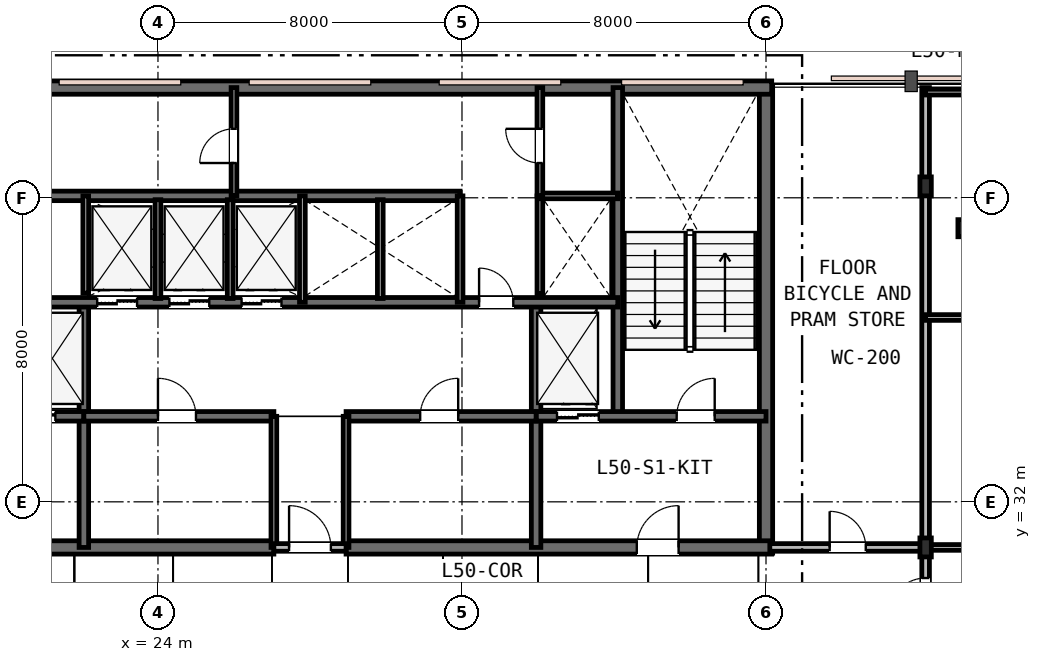
"""IFC4 building model, lengths in metres.
Left out: names, types, materials, properties, quantities, classifications, styles, units other than length and angle.
Written with IfcOpenShell. Run it as: python <this file> out.ifc"""

import sys

from ifc_helpers import new_model, si_unit, direction, frame, frame_2d, origin, origin_2d, place, context, subcontext, project, spatial, rectangle, i_section, extrude, element, fill, save


model = new_model("IFC4")
c1 = context("Model", 3, precision=1e-05, world=origin(), true_north=direction((0.0, 1.0)))
c2 = subcontext(c1, "Body", "Model", "MODEL_VIEW")
j1 = project(units=[si_unit("LENGTHUNIT", "METRE"), si_unit("PLANEANGLEUNIT", "RADIAN")], contexts=[c1])
p1 = place(None, origin())
s1 = spatial("IfcSite", under=j1, at=p1, CompositionType="ELEMENT")
p2 = place(p1, origin())
s2 = spatial("IfcBuilding", under=s1, at=p2, CompositionType="ELEMENT")
p3 = place(p2, frame((0.0, 0.0, 193.8)))
s3 = spatial("IfcBuildingStorey", under=s2, at=p3, CompositionType="ELEMENT", Elevation=193.8)
p4 = place(p3, frame((40.0, 30.65, 0.0), z_axis=(0.0, 0.0, 1.0), x_axis=(0.0, 1.0, 0.0)))
e1 = element("IfcWall", 1, at=p4, inside=s3, PredefinedType="SHEAR", context=c2, shape_type="SweptSolid", body=[
    extrude(rectangle(XDim=12.3, YDim=0.35, at=frame_2d((6.15, 0.0))), origin(), (0.0, 0.0, 1.0), 3.6),
])
p5 = place(p3, frame((15.85, 42.9, 0.0), z_axis=(0.0, 0.0, 1.0), x_axis=(1.0, 0.0, 0.0)))
e2 = element("IfcWall", 2, at=p5, inside=s3, PredefinedType="SHEAR", context=c2, shape_type="SweptSolid", body=[
    extrude(rectangle(XDim=24.3, YDim=0.35, at=frame_2d((12.15, 0.0))), origin(), (0.0, 0.0, 1.0), 3.6),
])
p6 = place(p3, frame((15.85, 30.8, 0.0), z_axis=(0.0, 0.0, 1.0), x_axis=(1.0, 0.0, 0.0)))
e3 = element("IfcWall", 3, at=p6, inside=s3, PredefinedType="SHEAR", context=c2, shape_type="SweptSolid", body=[
    extrude(rectangle(XDim=11.2, YDim=0.35, at=frame_2d((5.6, 0.0))), origin(), (0.0, 0.0, 1.0), 3.6),
])
p7 = place(p6, frame((2.45, 0.0, 0.0)))
e4 = element("IfcOpeningElement", 4, at=p7, cuts=e3, PredefinedType="OPENING", context=c2, shape_type="SweptSolid", body=[
    extrude(rectangle(XDim=1.1, YDim=2.15, at=frame_2d((0.55, 1.075))), frame((0.0, 0.185, 0.0), z_axis=(0.0, -1.0, 0.0), x_axis=(1.0, 0.0, 0.0)), (0.0, 0.0, 1.0), 0.37),
])
p8 = place(p3, frame((28.95, 30.8, 0.0), z_axis=(0.0, 0.0, 1.0), x_axis=(1.0, 0.0, 0.0)))
e5 = element("IfcWall", 5, at=p8, inside=s3, PredefinedType="SHEAR", context=c2, shape_type="SweptSolid", body=[
    extrude(rectangle(XDim=11.2, YDim=0.35, at=frame_2d((5.6, 0.0))), origin(), (0.0, 0.0, 1.0), 3.6),
])
p9 = place(p8, frame((7.65, 0.0, 0.0)))
e6 = element("IfcOpeningElement", 6, at=p9, cuts=e5, PredefinedType="OPENING", context=c2, shape_type="SweptSolid", body=[
    extrude(rectangle(XDim=1.1, YDim=2.15, at=frame_2d((0.55, 1.075))), frame((0.0, 0.185, 0.0), z_axis=(0.0, -1.0, 0.0), x_axis=(1.0, 0.0, 0.0)), (0.0, 0.0, 1.0), 0.37),
])
p10 = place(p3, frame((36.1, 34.25, 0.0), z_axis=(0.0, 0.0, 1.0), x_axis=(0.0, 1.0, 0.0)))
e7 = element("IfcWall", 7, at=p10, inside=s3, PredefinedType="SHEAR", context=c2, shape_type="SweptSolid", body=[
    extrude(rectangle(XDim=8.65, YDim=0.25, at=frame_2d((4.325, 0.0))), origin(), (0.0, 0.0, 1.0), 3.6),
])
for number, where, z_axis, x_axis in (
    (8, (22.05, 30.8, 0.0), (0.0, 0.0, 1.0), (0.0, 1.0, 0.0)),
    (9, (33.95, 30.8, 0.0), (0.0, 0.0, 1.0), (0.0, 1.0, 0.0)),
):
    element("IfcWall", number, at=place(p3, frame(where, z_axis=z_axis, x_axis=x_axis)), inside=s3, PredefinedType="SHEAR", context=c2, shape_type="SweptSolid", body=[
        extrude(rectangle(XDim=6.45, YDim=0.25, at=frame_2d((3.225, 0.0))), origin(), (0.0, 0.0, 1.0), 3.6),
    ])
p11 = place(p3, frame((16.0, 34.25, 0.0), z_axis=(0.0, 0.0, 1.0), x_axis=(1.0, 0.0, 0.0)))
e10 = element("IfcWall", 10, at=p11, inside=s3, PredefinedType="SHEAR", context=c2, shape_type="SweptSolid", body=[
    extrude(rectangle(XDim=6.05, YDim=0.25, at=frame_2d((3.025, 0.0))), origin(), (0.0, 0.0, 1.0), 3.6),
])
p12 = place(p11, frame((1.25, 0.0, 0.0)))
e11 = element("IfcOpeningElement", 11, at=p12, cuts=e10, PredefinedType="OPENING", context=c2, shape_type="SweptSolid", body=[
    extrude(rectangle(XDim=1.0, YDim=2.15, at=frame_2d((0.5, 1.075))), frame((0.0, 0.135, 0.0), z_axis=(0.0, -1.0, 0.0), x_axis=(1.0, 0.0, 0.0)), (0.0, 0.0, 1.0), 0.27),
])
p13 = place(p11, frame((4.2, 0.0, 0.0)))
e12 = element("IfcOpeningElement", 12, at=p13, cuts=e10, PredefinedType="OPENING", context=c2, shape_type="SweptSolid", body=[
    extrude(rectangle(XDim=1.1, YDim=2.15, at=frame_2d((0.55, 1.075))), frame((0.0, 0.135, 0.0), z_axis=(0.0, -1.0, 0.0), x_axis=(1.0, 0.0, 0.0)), (0.0, 0.0, 1.0), 0.27),
])
p14 = place(p3, frame((33.95, 34.25, 0.0), z_axis=(0.0, 0.0, 1.0), x_axis=(1.0, 0.0, 0.0)))
e13 = element("IfcWall", 13, at=p14, inside=s3, PredefinedType="SHEAR", context=c2, shape_type="SweptSolid", body=[
    extrude(rectangle(XDim=6.05, YDim=0.25, at=frame_2d((3.025, 0.0))), origin(), (0.0, 0.0, 1.0), 3.6),
])
p15 = place(p14, frame((3.7, 0.0, 0.0)))
e14 = element("IfcOpeningElement", 14, at=p15, cuts=e13, PredefinedType="OPENING", context=c2, shape_type="SweptSolid", body=[
    extrude(rectangle(XDim=1.0, YDim=2.15, at=frame_2d((0.5, 1.075))), frame((0.0, 0.135, 0.0), z_axis=(0.0, -1.0, 0.0), x_axis=(1.0, 0.0, 0.0)), (0.0, 0.0, 1.0), 0.27),
])
p16 = place(p14, frame((0.55, 0.0, 0.0)))
e15 = element("IfcOpeningElement", 15, at=p16, cuts=e13, PredefinedType="OPENING", context=c2, shape_type="SweptSolid", body=[
    extrude(rectangle(XDim=1.1, YDim=2.15, at=frame_2d((0.55, 1.075))), frame((0.0, 0.135, 0.0), z_axis=(0.0, -1.0, 0.0), x_axis=(1.0, 0.0, 0.0)), (0.0, 0.0, 1.0), 0.27),
])
p17 = place(p3, frame((22.05, 34.25, 0.0), z_axis=(0.0, 0.0, 1.0), x_axis=(1.0, 0.0, 0.0)))
e16 = element("IfcWall", 16, at=p17, inside=s3, PredefinedType="SHEAR", context=c2, shape_type="SweptSolid", body=[
    extrude(rectangle(XDim=5.0, YDim=0.25, at=frame_2d((2.5, 0.0))), origin(), (0.0, 0.0, 1.0), 3.6),
])
p18 = place(p17, frame((1.95, 0.0, 0.0)))
e17 = element("IfcOpeningElement", 17, at=p18, cuts=e16, PredefinedType="OPENING", context=c2, shape_type="SweptSolid", body=[
    extrude(rectangle(XDim=1.0, YDim=2.15, at=frame_2d((0.5, 1.075))), frame((0.0, 0.135, 0.0), z_axis=(0.0, -1.0, 0.0), x_axis=(1.0, 0.0, 0.0)), (0.0, 0.0, 1.0), 0.27),
])
p19 = place(p3, frame((28.95, 34.25, 0.0), z_axis=(0.0, 0.0, 1.0), x_axis=(1.0, 0.0, 0.0)))
e18 = element("IfcWall", 18, at=p19, inside=s3, PredefinedType="SHEAR", context=c2, shape_type="SweptSolid", body=[
    extrude(rectangle(XDim=5.0, YDim=0.25, at=frame_2d((2.5, 0.0))), origin(), (0.0, 0.0, 1.0), 3.6),
])
p20 = place(p19, frame((1.95, 0.0, 0.0)))
e19 = element("IfcOpeningElement", 19, at=p20, cuts=e18, PredefinedType="OPENING", context=c2, shape_type="SweptSolid", body=[
    extrude(rectangle(XDim=1.0, YDim=2.15, at=frame_2d((0.5, 1.075))), frame((0.0, 0.135, 0.0), z_axis=(0.0, -1.0, 0.0), x_axis=(1.0, 0.0, 0.0)), (0.0, 0.0, 1.0), 0.27),
])
p21 = place(p3, frame((19.9, 37.25, 0.0), z_axis=(0.0, 0.0, 1.0), x_axis=(1.0, 0.0, 0.0)))
e20 = element("IfcWall", 20, at=p21, inside=s3, PredefinedType="SHEAR", context=c2, shape_type="SweptSolid", body=[
    extrude(rectangle(XDim=16.2, YDim=0.25, at=frame_2d((8.1, 0.0))), origin(), (0.0, 0.0, 1.0), 3.6),
])
p22 = place(p21, frame((12.55, 0.0, 0.0)))
e21 = element("IfcOpeningElement", 21, at=p22, cuts=e20, PredefinedType="OPENING", context=c2, shape_type="SweptSolid", body=[
    extrude(rectangle(XDim=0.9, YDim=2.15, at=frame_2d((0.45, 1.075))), frame((0.0, 0.135, 0.0), z_axis=(0.0, -1.0, 0.0), x_axis=(1.0, 0.0, 0.0)), (0.0, 0.0, 1.0), 0.27),
])
p23 = place(p21, frame((2.5, 0.0, 0.0)))
e22 = element("IfcOpeningElement", 22, at=p23, cuts=e20, PredefinedType="OPENING", context=c2, shape_type="SweptSolid", body=[
    extrude(rectangle(XDim=1.05, YDim=2.15, at=frame_2d((0.525, 1.075))), frame((0.0, 0.135, 0.0), z_axis=(0.0, -1.0, 0.0), x_axis=(1.0, 0.0, 0.0)), (0.0, 0.0, 1.0), 0.27),
])
p24 = place(p21, frame((4.4, 0.0, 0.0)))
e23 = element("IfcOpeningElement", 23, at=p24, cuts=e20, PredefinedType="OPENING", context=c2, shape_type="SweptSolid", body=[
    extrude(rectangle(XDim=1.05, YDim=2.15, at=frame_2d((0.525, 1.075))), frame((0.0, 0.135, 0.0), z_axis=(0.0, -1.0, 0.0), x_axis=(1.0, 0.0, 0.0)), (0.0, 0.0, 1.0), 0.27),
])
p25 = place(p21, frame((6.3, 0.0, 0.0)))
e24 = element("IfcOpeningElement", 24, at=p25, cuts=e20, PredefinedType="OPENING", context=c2, shape_type="SweptSolid", body=[
    extrude(rectangle(XDim=1.05, YDim=2.15, at=frame_2d((0.525, 1.075))), frame((0.0, 0.135, 0.0), z_axis=(0.0, -1.0, 0.0), x_axis=(1.0, 0.0, 0.0)), (0.0, 0.0, 1.0), 0.27),
])
p26 = place(p3, frame((19.9, 40.05, 0.0), z_axis=(0.0, 0.0, 1.0), x_axis=(1.0, 0.0, 0.0)))
e25 = element("IfcWall", 25, at=p26, inside=s3, PredefinedType="SHEAR", context=c2, shape_type="SweptSolid", body=[
    extrude(rectangle(XDim=12.05, YDim=0.25, at=frame_2d((6.025, 0.0))), origin(), (0.0, 0.0, 1.0), 3.6),
])
p27 = place(p3, frame((45.2, 39.2, 0.0), z_axis=(0.0, 0.0, 1.0), x_axis=(1.0, 0.0, 0.0)))
e26 = element("IfcColumn", 26, at=p27, inside=s3, PredefinedType="COLUMN", context=c2, shape_type="SweptSolid", body=[
    extrude(i_section(OverallWidth=0.3, OverallDepth=0.45, WebThickness=0.014, FlangeThickness=0.026, FilletRadius=0.027, at=origin_2d()), origin(), (0.0, 0.0, 1.0), 3.6),
])
for number, where, z_axis, x_axis in (
    (27, (44.2, 30.8, 0.0), (0.0, 0.0, 1.0), (1.0, 0.0, 0.0)),
    (28, (44.2, 40.3, 0.0), (0.0, 0.0, 1.0), (1.0, 0.0, 0.0)),
):
    element("IfcColumn", number, at=place(p3, frame(where, z_axis=z_axis, x_axis=x_axis)), inside=s3, PredefinedType="COLUMN", context=c2, shape_type="SweptSolid", body=[
        extrude(i_section(OverallWidth=0.3, OverallDepth=0.5, WebThickness=0.015, FlangeThickness=0.028, FilletRadius=0.027, at=origin_2d()), origin(), (0.0, 0.0, 1.0), 3.6),
    ])
for number, where, z_axis, x_axis in (
    (29, (27.05, 30.8, 0.0), (0.0, 0.0, 1.0), (0.0, 1.0, 0.0)),
    (30, (28.95, 30.8, 0.0), (0.0, 0.0, 1.0), (0.0, 1.0, 0.0)),
):
    element("IfcWall", number, at=place(p3, frame(where, z_axis=z_axis, x_axis=x_axis)), inside=s3, PredefinedType="PLUMBINGWALL", context=c2, shape_type="SweptSolid", body=[
        extrude(rectangle(XDim=3.45, YDim=0.15, at=frame_2d((1.725, 0.0))), origin(), (0.0, 0.0, 1.0), 3.07),
    ])
p28 = place(p3, frame((27.05, 30.8, 0.0), z_axis=(0.0, 0.0, 1.0), x_axis=(1.0, 0.0, 0.0)))
e31 = element("IfcWall", 31, at=p28, inside=s3, PredefinedType="PARTITIONING", context=c2, shape_type="SweptSolid", body=[
    extrude(rectangle(XDim=1.9, YDim=0.2, at=frame_2d((0.95, 0.0))), origin(), (0.0, 0.0, 1.0), 3.07),
])
p29 = place(p28, frame((0.4, 0.0, 0.0)))
e32 = element("IfcOpeningElement", 32, at=p29, cuts=e31, PredefinedType="OPENING", context=c2, shape_type="SweptSolid", body=[
    extrude(rectangle(XDim=1.1, YDim=2.15, at=frame_2d((0.55, 1.075))), frame((0.0, 0.11, 0.0), z_axis=(0.0, -1.0, 0.0), x_axis=(1.0, 0.0, 0.0)), (0.0, 0.0, 1.0), 0.22),
])
p30 = place(p3, frame((22.1, 37.49, 0.0), z_axis=(0.0, 0.0, 1.0), x_axis=(0.0, 1.0, 0.0)))
e33 = element("IfcWall", 33, at=p30, inside=s3, PredefinedType="PLUMBINGWALL", context=c2, shape_type="SweptSolid", body=[
    extrude(rectangle(XDim=2.56, YDim=0.15, at=frame_2d((1.28, 0.0))), origin(), (0.0, 0.0, 1.0), 3.33),
])
p31 = place(p3, frame((27.8, 37.25, 0.0), z_axis=(0.0, 0.0, 1.0), x_axis=(0.0, 1.0, 0.0)))
e34 = element("IfcWall", 34, at=p31, inside=s3, PredefinedType="PLUMBINGWALL", context=c2, shape_type="SweptSolid", body=[
    extrude(rectangle(XDim=2.8, YDim=0.15, at=frame_2d((1.4, 0.0))), origin(), (0.0, 0.0, 1.0), 3.33),
])
for number, where, z_axis, x_axis in (
    (35, (24.0, 37.35, 0.0), (0.0, 0.0, 1.0), (0.0, 1.0, 0.0)),
    (36, (25.9, 37.35, 0.0), (0.0, 0.0, 1.0), (0.0, 1.0, 0.0)),
):
    element("IfcWall", number, at=place(p3, frame(where, z_axis=z_axis, x_axis=x_axis)), inside=s3, PredefinedType="PLUMBINGWALL", context=c2, shape_type="SweptSolid", body=[
        extrude(rectangle(XDim=2.6, YDim=0.15, at=frame_2d((1.3, 0.0))), origin(), (0.0, 0.0, 1.0), 3.33),
    ])
p32 = place(p3, frame((31.95, 37.25, 0.0), z_axis=(0.0, 0.0, 1.0), x_axis=(0.0, 1.0, 0.0)))
e37 = element("IfcWall", 37, at=p32, inside=s3, PredefinedType="PLUMBINGWALL", context=c2, shape_type="SweptSolid", body=[
    extrude(rectangle(XDim=2.8, YDim=0.15, at=frame_2d((1.4, 0.0))), origin(), (0.0, 0.0, 1.0), 3.33),
])
p33 = place(p3, frame((29.85, 37.35, 0.0), z_axis=(0.0, 0.0, 1.0), x_axis=(0.0, 1.0, 0.0)))
e38 = element("IfcWall", 38, at=p33, inside=s3, PredefinedType="PLUMBINGWALL", context=c2, shape_type="SweptSolid", body=[
    extrude(rectangle(XDim=2.6, YDim=0.15, at=frame_2d((1.3, 0.0))), origin(), (0.0, 0.0, 1.0), 3.33),
])
p34 = place(p3, frame((34.05, 37.473, 0.0), z_axis=(0.0, 0.0, 1.0), x_axis=(0.0, 1.0, 0.0)))
e39 = element("IfcWall", 39, at=p34, inside=s3, PredefinedType="PLUMBINGWALL", context=c2, shape_type="SweptSolid", body=[
    extrude(rectangle(XDim=2.577, YDim=0.15, at=frame_2d((1.288, 0.0))), origin(), (0.0, 0.0, 1.0), 3.33),
])
p35 = place(p3, frame((34.05, 40.05, 0.0), z_axis=(0.0, 0.0, 1.0), x_axis=(1.0, 0.0, 0.0)))
e40 = element("IfcWall", 40, at=p35, inside=s3, PredefinedType="PARTITIONING", context=c2, shape_type="SweptSolid", body=[
    extrude(rectangle(XDim=2.05, YDim=0.15, at=frame_2d((1.025, 0.0))), origin(), (0.0, 0.0, 1.0), 3.33),
])
p36 = place(p3, frame((34.05, 40.05, 0.0), z_axis=(0.0, 0.0, 1.0), x_axis=(0.0, 1.0, 0.0)))
e41 = element("IfcWall", 41, at=p36, inside=s3, PredefinedType="PARTITIONING", context=c2, shape_type="SweptSolid", body=[
    extrude(rectangle(XDim=2.85, YDim=0.15, at=frame_2d((1.425, 0.0))), origin(), (0.0, 0.0, 1.0), 3.33),
])
p37 = place(p36, frame((0.865, 0.0, 0.0)))
e42 = element("IfcOpeningElement", 42, at=p37, cuts=e41, PredefinedType="OPENING", context=c2, shape_type="SweptSolid", body=[
    extrude(rectangle(XDim=0.9, YDim=2.15, at=frame_2d((0.45, 1.075))), frame((0.0, 0.085, 0.0), z_axis=(0.0, -1.0, 0.0), x_axis=(1.0, 0.0, 0.0)), (0.0, 0.0, 1.0), 0.17),
])
p38 = place(p3, frame((26.0, 40.05, 0.0), z_axis=(0.0, 0.0, 1.0), x_axis=(0.0, 1.0, 0.0)))
e43 = element("IfcWall", 43, at=p38, inside=s3, PredefinedType="PARTITIONING", context=c2, shape_type="SweptSolid", body=[
    extrude(rectangle(XDim=2.85, YDim=0.15, at=frame_2d((1.425, 0.0))), origin(), (0.0, 0.0, 1.0), 3.33),
])
p39 = place(p38, frame((0.865, 0.0, 0.0)))
e44 = element("IfcOpeningElement", 44, at=p39, cuts=e43, PredefinedType="OPENING", context=c2, shape_type="SweptSolid", body=[
    extrude(rectangle(XDim=0.9, YDim=2.15, at=frame_2d((0.45, 1.075))), frame((0.0, 0.085, 0.0), z_axis=(0.0, -1.0, 0.0), x_axis=(1.0, 0.0, 0.0)), (0.0, 0.0, 1.0), 0.17),
])
p40 = place(p3, frame((40.1, 30.8, 0.0), z_axis=(0.0, 0.0, 1.0), x_axis=(1.0, 0.0, 0.0)))
e45 = element("IfcWall", 45, at=p40, inside=s3, PredefinedType="PARTITIONING", context=c2, shape_type="SweptSolid", body=[
    extrude(rectangle(XDim=4.1, YDim=0.2, at=frame_2d((2.05, 0.0))), origin(), (0.0, 0.0, 1.0), 2.92),
])
p41 = place(p40, frame((1.575, 0.0, 0.0)))
e46 = element("IfcOpeningElement", 46, at=p41, cuts=e45, PredefinedType="OPENING", context=c2, shape_type="SweptSolid", body=[
    extrude(rectangle(XDim=0.95, YDim=2.15, at=frame_2d((0.475, 1.075))), frame((0.0, 0.11, 0.0), z_axis=(0.0, -1.0, 0.0), x_axis=(1.0, 0.0, 0.0)), (0.0, 0.0, 1.0), 0.22),
])
p42 = place(p3, frame((44.2, 28.6, 0.0), z_axis=(0.0, 0.0, 1.0), x_axis=(0.0, 1.0, 0.0)))
e47 = element("IfcWall", 47, at=p42, inside=s3, PredefinedType="PARTITIONING", context=c2, shape_type="SweptSolid", body=[
    extrude(rectangle(XDim=14.3, YDim=0.2, at=frame_2d((7.15, 0.0))), origin(), (0.0, 0.0, 1.0), 2.92),
])
p43 = place(p42, frame((0.445, 0.0, 0.0)))
e48 = element("IfcOpeningElement", 48, at=p43, cuts=e47, PredefinedType="OPENING", context=c2, shape_type="SweptSolid", body=[
    extrude(rectangle(XDim=0.95, YDim=2.15, at=frame_2d((0.475, 1.075))), frame((0.0, 0.11, 0.0), z_axis=(0.0, -1.0, 0.0), x_axis=(1.0, 0.0, 0.0)), (0.0, 0.0, 1.0), 0.22),
])
for number, where, z_axis, x_axis in (
    (49, (44.2, 30.8, 0.0), (0.0, 0.0, 1.0), (1.0, 0.0, 0.0)),
    (50, (44.2, 36.85, 0.0), (0.0, 0.0, 1.0), (1.0, 0.0, 0.0)),
):
    element("IfcWall", number, at=place(p3, frame(where, z_axis=z_axis, x_axis=x_axis)), inside=s3, PredefinedType="PARTITIONING", context=c2, shape_type="SweptSolid", body=[
        extrude(rectangle(XDim=2.546, YDim=0.15, at=frame_2d((1.273, 0.0))), origin(), (0.0, 0.0, 1.0), 2.92),
    ])
p44 = place(p3, frame((44.2, 42.78, 0.0), z_axis=(0.0, 0.0, 1.0), x_axis=(1.0, 0.0, 0.0)))
e51 = element("IfcWall", 51, at=p44, inside=s3, PredefinedType="PARTITIONING", context=c2, shape_type="SweptSolid", body=[
    extrude(rectangle(XDim=2.546, YDim=0.15, at=frame_2d((1.273, 0.0))), origin(), (0.0, 0.0, 1.0), 3.33),
])
p45 = place(p29, origin())
e52 = element("IfcDoor", 52, at=p45, inside=s3, OperationType="SINGLE_SWING_LEFT", PredefinedType="DOOR", context=c2, shape_type="SweptSolid", body=[
    extrude(rectangle(XDim=1.1, YDim=2.15, at=frame_2d((0.55, 1.075))), frame((0.0, 0.025, 0.0), z_axis=(0.0, -1.0, 0.0), x_axis=(1.0, 0.0, 0.0)), (0.0, 0.0, 1.0), 0.05),
])
fill(e32, e52)
p46 = place(p15, origin())
e53 = element("IfcDoor", 53, at=p46, inside=s3, OperationType="SINGLE_SWING_RIGHT", PredefinedType="DOOR", context=c2, shape_type="SweptSolid", body=[
    extrude(rectangle(XDim=1.0, YDim=2.15, at=frame_2d((0.5, 1.075))), frame((0.0, 0.025, 0.0), z_axis=(0.0, -1.0, 0.0), x_axis=(1.0, 0.0, 0.0)), (0.0, 0.0, 1.0), 0.05),
])
fill(e14, e53)
p47 = place(p9, origin())
e54 = element("IfcDoor", 54, at=p47, inside=s3, OperationType="SINGLE_SWING_RIGHT", PredefinedType="DOOR", context=c2, shape_type="SweptSolid", body=[
    extrude(rectangle(XDim=1.1, YDim=2.15, at=frame_2d((0.55, 1.075))), frame((0.0, 0.025, 0.0), z_axis=(0.0, -1.0, 0.0), x_axis=(1.0, 0.0, 0.0)), (0.0, 0.0, 1.0), 0.05),
])
fill(e6, e54)
p48 = place(p18, origin())
e55 = element("IfcDoor", 55, at=p48, inside=s3, OperationType="SINGLE_SWING_LEFT", PredefinedType="DOOR", context=c2, shape_type="SweptSolid", body=[
    extrude(rectangle(XDim=1.0, YDim=2.15, at=frame_2d((0.5, 1.075))), frame((0.0, 0.025, 0.0), z_axis=(0.0, -1.0, 0.0), x_axis=(1.0, 0.0, 0.0)), (0.0, 0.0, 1.0), 0.05),
])
fill(e17, e55)
p49 = place(p20, origin())
e56 = element("IfcDoor", 56, at=p49, inside=s3, OperationType="SINGLE_SWING_RIGHT", PredefinedType="DOOR", context=c2, shape_type="SweptSolid", body=[
    extrude(rectangle(XDim=1.0, YDim=2.15, at=frame_2d((0.5, 1.075))), frame((0.0, 0.025, 0.0), z_axis=(0.0, -1.0, 0.0), x_axis=(1.0, 0.0, 0.0)), (0.0, 0.0, 1.0), 0.05),
])
fill(e19, e56)
p50 = place(p22, origin())
e57 = element("IfcDoor", 57, at=p50, inside=s3, OperationType="SINGLE_SWING_LEFT", PredefinedType="DOOR", context=c2, shape_type="SweptSolid", body=[
    extrude(rectangle(XDim=0.9, YDim=2.15, at=frame_2d((0.45, 1.075))), frame((0.0, 0.025, 0.0), z_axis=(0.0, -1.0, 0.0), x_axis=(1.0, 0.0, 0.0)), (0.0, 0.0, 1.0), 0.05),
])
fill(e21, e57)
p51 = place(p37, origin())
e58 = element("IfcDoor", 58, at=p51, inside=s3, OperationType="SINGLE_SWING_RIGHT", PredefinedType="DOOR", context=c2, shape_type="SweptSolid", body=[
    extrude(rectangle(XDim=0.9, YDim=2.15, at=frame_2d((0.45, 1.075))), frame((0.0, 0.025, 0.0), z_axis=(0.0, -1.0, 0.0), x_axis=(1.0, 0.0, 0.0)), (0.0, 0.0, 1.0), 0.05),
])
fill(e42, e58)
p52 = place(p39, origin())
e59 = element("IfcDoor", 59, at=p52, inside=s3, OperationType="SINGLE_SWING_LEFT", PredefinedType="DOOR", context=c2, shape_type="SweptSolid", body=[
    extrude(rectangle(XDim=0.9, YDim=2.15, at=frame_2d((0.45, 1.075))), frame((0.0, 0.025, 0.0), z_axis=(0.0, -1.0, 0.0), x_axis=(1.0, 0.0, 0.0)), (0.0, 0.0, 1.0), 0.05),
])
fill(e44, e59)
p53 = place(p41, origin())
e60 = element("IfcDoor", 60, at=p53, inside=s3, OperationType="SINGLE_SWING_LEFT", PredefinedType="DOOR", context=c2, shape_type="SweptSolid", body=[
    extrude(rectangle(XDim=0.95, YDim=2.15, at=frame_2d((0.475, 1.075))), frame((0.0, 0.025, 0.0), z_axis=(0.0, -1.0, 0.0), x_axis=(1.0, 0.0, 0.0)), (0.0, 0.0, 1.0), 0.05),
])
fill(e46, e60)
p54 = place(p43, origin())
e61 = element("IfcDoor", 61, at=p54, inside=s3, OperationType="SINGLE_SWING_LEFT", PredefinedType="DOOR", context=c2, shape_type="SweptSolid", body=[
    extrude(rectangle(XDim=0.95, YDim=2.15, at=frame_2d((0.475, 1.075))), frame((0.0, 0.025, 0.0), z_axis=(0.0, -1.0, 0.0), x_axis=(1.0, 0.0, 0.0)), (0.0, 0.0, 1.0), 0.05),
])
fill(e48, e61)
p55 = place(p13, origin())
e62 = element("IfcDoor", 62, at=p55, inside=s3, OperationType="DOUBLE_DOOR_SLIDING", PredefinedType="DOOR", context=c2, shape_type="SweptSolid", body=[
    extrude(rectangle(XDim=1.1, YDim=2.15, at=frame_2d((0.55, 1.075))), frame((0.0, 0.025, 0.0), z_axis=(0.0, -1.0, 0.0), x_axis=(1.0, 0.0, 0.0)), (0.0, 0.0, 1.0), 0.05),
])
fill(e12, e62)
p56 = place(p16, origin())
e63 = element("IfcDoor", 63, at=p56, inside=s3, OperationType="DOUBLE_DOOR_SLIDING", PredefinedType="DOOR", context=c2, shape_type="SweptSolid", body=[
    extrude(rectangle(XDim=1.1, YDim=2.15, at=frame_2d((0.55, 1.075))), frame((0.0, 0.025, 0.0), z_axis=(0.0, -1.0, 0.0), x_axis=(1.0, 0.0, 0.0)), (0.0, 0.0, 1.0), 0.05),
])
fill(e15, e63)
p57 = place(p23, origin())
e64 = element("IfcDoor", 64, at=p57, inside=s3, OperationType="DOUBLE_DOOR_SLIDING", PredefinedType="DOOR", context=c2, shape_type="SweptSolid", body=[
    extrude(rectangle(XDim=1.05, YDim=2.15, at=frame_2d((0.525, 1.075))), frame((0.0, 0.025, 0.0), z_axis=(0.0, -1.0, 0.0), x_axis=(1.0, 0.0, 0.0)), (0.0, 0.0, 1.0), 0.05),
])
fill(e22, e64)
p58 = place(p24, origin())
e65 = element("IfcDoor", 65, at=p58, inside=s3, OperationType="DOUBLE_DOOR_SLIDING", PredefinedType="DOOR", context=c2, shape_type="SweptSolid", body=[
    extrude(rectangle(XDim=1.05, YDim=2.15, at=frame_2d((0.525, 1.075))), frame((0.0, 0.025, 0.0), z_axis=(0.0, -1.0, 0.0), x_axis=(1.0, 0.0, 0.0)), (0.0, 0.0, 1.0), 0.05),
])
fill(e23, e65)
p59 = place(p25, origin())
e66 = element("IfcDoor", 66, at=p59, inside=s3, OperationType="DOUBLE_DOOR_SLIDING", PredefinedType="DOOR", context=c2, shape_type="SweptSolid", body=[
    extrude(rectangle(XDim=1.05, YDim=2.15, at=frame_2d((0.525, 1.075))), frame((0.0, 0.025, 0.0), z_axis=(0.0, -1.0, 0.0), x_axis=(1.0, 0.0, 0.0)), (0.0, 0.0, 1.0), 0.05),
])
fill(e24, e66)
save(model, sys.argv[1])
